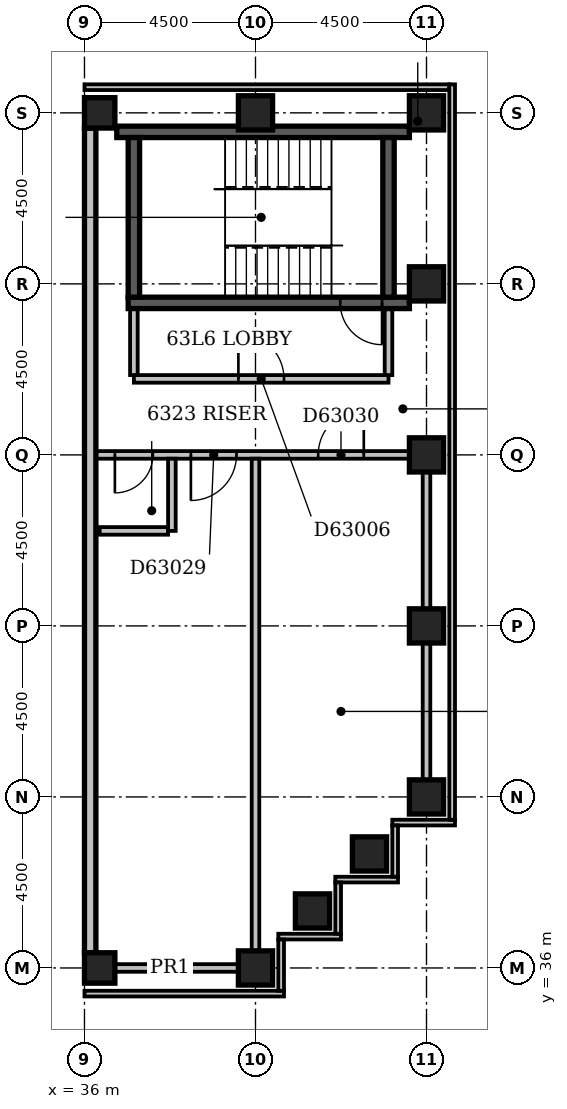
"""IFC4 building model, lengths in metres.
Left out: names, types, materials, properties, quantities, classifications, styles, units other than length and angle.
Written with IfcOpenShell. Run it as: python <this file> out.ifc"""

import sys

from ifc_helpers import new_model, si_unit, direction, frame, frame_2d, origin, origin_2d, place, context, subcontext, project, spatial, rectangle, extrude, element, fill, save


model = new_model("IFC4")
c1 = context("Model", 3, precision=1e-05, world=origin(), true_north=direction((0.0, 1.0)))
c2 = subcontext(c1, "Body", "Model", "MODEL_VIEW")
j1 = project(units=[si_unit("LENGTHUNIT", "METRE"), si_unit("PLANEANGLEUNIT", "RADIAN")], contexts=[c1])
p1 = place(None, origin())
s1 = spatial("IfcSite", under=j1, at=p1, CompositionType="ELEMENT")
p2 = place(p1, origin())
s2 = spatial("IfcBuilding", under=s1, at=p2, CompositionType="ELEMENT")
p3 = place(p2, frame((0.0, 0.0, 243.8)))
s3 = spatial("IfcBuildingStorey", under=s2, at=p3, CompositionType="ELEMENT", Elevation=243.8)
p4 = place(p3, frame((36.85, 58.0, -0.3), z_axis=(0.0, 0.0, 1.0), x_axis=(1.0, 0.0, 0.0)))
e1 = element("IfcWall", 1, at=p4, inside=s3, PredefinedType="SHEAR", context=c2, shape_type="SweptSolid", body=[
    extrude(rectangle(XDim=7.7, YDim=0.3, at=frame_2d((3.85, 0.0))), origin(), (0.0, 0.0, 1.0), 3.6),
])
p5 = place(p3, frame((37.15, 53.5, -0.3), z_axis=(0.0, 0.0, 1.0), x_axis=(1.0, 0.0, 0.0)))
e2 = element("IfcWall", 2, at=p5, inside=s3, PredefinedType="SHEAR", context=c2, shape_type="SweptSolid", body=[
    extrude(rectangle(XDim=7.4, YDim=0.3, at=frame_2d((3.7, 0.0))), origin(), (0.0, 0.0, 1.0), 3.6),
])
p6 = place(p5, frame((5.58, 0.0, 0.3)))
e3 = element("IfcOpeningElement", 3, at=p6, cuts=e2, PredefinedType="OPENING", context=c2, shape_type="SweptSolid", body=[
    extrude(rectangle(XDim=1.1, YDim=2.1, at=frame_2d((0.55, 1.05))), frame((0.0, 0.162, 0.0), z_axis=(0.0, -1.0, 0.0), x_axis=(1.0, 0.0, 0.0)), (0.0, 0.0, 1.0), 0.324),
])
for number, where, z_axis, x_axis in (
    (4, (37.3, 53.65, -0.3), (0.0, 0.0, 1.0), (0.0, 1.0, 0.0)),
    (5, (44.0, 53.65, -0.3), (0.0, 0.0, 1.0), (0.0, 1.0, 0.0)),
):
    element("IfcWall", number, at=place(p3, frame(where, z_axis=z_axis, x_axis=x_axis)), inside=s3, PredefinedType="SHEAR", context=c2, shape_type="SweptSolid", body=[
        extrude(rectangle(XDim=4.2, YDim=0.3, at=frame_2d((2.1, 0.0))), origin(), (0.0, 0.0, 1.0), 3.6),
    ])
p7 = place(p3, frame((36.4, 36.0, -0.3), z_axis=(0.0, 0.0, 1.0), x_axis=(1.0, 0.0, 0.0)))
e6 = element("IfcColumn", 6, at=p7, inside=s3, PredefinedType="COLUMN", context=c2, shape_type="SweptSolid", body=[
    extrude(rectangle(XDim=0.8, YDim=0.8, at=origin_2d()), origin(), (0.0, 0.0, 1.0), 3.6),
])
for number, where, z_axis, x_axis in (
    (7, (40.5, 36.0, -0.3), (0.0, 0.0, 1.0), (1.0, 0.0, 0.0)),
    (8, (42.0, 37.5, -0.3), (0.0, 0.0, 1.0), (1.0, 0.0, 0.0)),
    (9, (43.5, 39.0, -0.3), (0.0, 0.0, 1.0), (1.0, 0.0, 0.0)),
    (10, (45.0, 40.5, -0.3), (0.0, 0.0, 1.0), (1.0, 0.0, 0.0)),
    (11, (45.0, 45.0, -0.3), (0.0, 0.0, 1.0), (1.0, 0.0, 0.0)),
    (12, (45.0, 49.5, -0.3), (0.0, 0.0, 1.0), (1.0, 0.0, 0.0)),
    (13, (45.0, 54.0, -0.3), (0.0, 0.0, 1.0), (1.0, 0.0, 0.0)),
):
    element("IfcColumn", number, at=place(p3, frame(where, z_axis=z_axis, x_axis=x_axis)), inside=s3, PredefinedType="COLUMN", context=c2, shape_type="SweptSolid", body=[
        extrude(rectangle(XDim=0.9, YDim=0.9, at=origin_2d()), origin(), (0.0, 0.0, 1.0), 3.6),
    ])
p8 = place(p3, frame((36.4, 58.5, -0.3), z_axis=(0.0, 0.0, 1.0), x_axis=(1.0, 0.0, 0.0)))
e14 = element("IfcColumn", 14, at=p8, inside=s3, PredefinedType="COLUMN", context=c2, shape_type="SweptSolid", body=[
    extrude(rectangle(XDim=0.8, YDim=0.8, at=origin_2d()), origin(), (0.0, 0.0, 1.0), 3.6),
])
for number, where, z_axis, x_axis in (
    (15, (40.5, 58.5, -0.3), (0.0, 0.0, 1.0), (1.0, 0.0, 0.0)),
    (16, (45.0, 58.5, -0.3), (0.0, 0.0, 1.0), (1.0, 0.0, 0.0)),
):
    element("IfcColumn", number, at=place(p3, frame(where, z_axis=z_axis, x_axis=x_axis)), inside=s3, PredefinedType="COLUMN", context=c2, shape_type="SweptSolid", body=[
        extrude(rectangle(XDim=0.9, YDim=0.9, at=origin_2d()), origin(), (0.0, 0.0, 1.0), 3.6),
    ])
p9 = place(p3, frame((36.0, 35.325, 0.0), z_axis=(0.0, 0.0, 1.0), x_axis=(1.0, 0.0, 0.0)))
e17 = element("IfcWall", 17, at=p9, inside=s3, PredefinedType="STANDARD", context=c2, shape_type="SweptSolid", body=[
    extrude(rectangle(XDim=5.25, YDim=0.15, at=frame_2d((2.625, 0.0))), origin(), (0.0, 0.0, 1.0), 2.7),
])
p10 = place(p3, frame((41.175, 35.4, 0.0), z_axis=(0.0, 0.0, 1.0), x_axis=(0.0, 1.0, 0.0)))
e18 = element("IfcWall", 18, at=p10, inside=s3, PredefinedType="STANDARD", context=c2, shape_type="SweptSolid", body=[
    extrude(rectangle(XDim=1.35, YDim=0.15, at=frame_2d((0.675, 0.0))), origin(), (0.0, 0.0, 1.0), 2.7),
])
p11 = place(p3, frame((41.1, 36.825, 0.0), z_axis=(0.0, 0.0, 1.0), x_axis=(1.0, 0.0, 0.0)))
e19 = element("IfcWall", 19, at=p11, inside=s3, PredefinedType="STANDARD", context=c2, shape_type="SweptSolid", body=[
    extrude(rectangle(XDim=1.65, YDim=0.15, at=frame_2d((0.825, 0.0))), origin(), (0.0, 0.0, 1.0), 2.7),
])
p12 = place(p3, frame((42.675, 36.9, 0.0), z_axis=(0.0, 0.0, 1.0), x_axis=(0.0, 1.0, 0.0)))
e20 = element("IfcWall", 20, at=p12, inside=s3, PredefinedType="STANDARD", context=c2, shape_type="SweptSolid", body=[
    extrude(rectangle(XDim=1.35, YDim=0.15, at=frame_2d((0.675, 0.0))), origin(), (0.0, 0.0, 1.0), 2.7),
])
p13 = place(p3, frame((42.6, 38.325, 0.0), z_axis=(0.0, 0.0, 1.0), x_axis=(1.0, 0.0, 0.0)))
e21 = element("IfcWall", 21, at=p13, inside=s3, PredefinedType="STANDARD", context=c2, shape_type="SweptSolid", body=[
    extrude(rectangle(XDim=1.65, YDim=0.15, at=frame_2d((0.825, 0.0))), origin(), (0.0, 0.0, 1.0), 2.7),
])
p14 = place(p3, frame((44.175, 38.4, 0.0), z_axis=(0.0, 0.0, 1.0), x_axis=(0.0, 1.0, 0.0)))
e22 = element("IfcWall", 22, at=p14, inside=s3, PredefinedType="STANDARD", context=c2, shape_type="SweptSolid", body=[
    extrude(rectangle(XDim=1.35, YDim=0.15, at=frame_2d((0.675, 0.0))), origin(), (0.0, 0.0, 1.0), 2.7),
])
p15 = place(p3, frame((44.1, 39.825, 0.0), z_axis=(0.0, 0.0, 1.0), x_axis=(1.0, 0.0, 0.0)))
e23 = element("IfcWall", 23, at=p15, inside=s3, PredefinedType="STANDARD", context=c2, shape_type="SweptSolid", body=[
    extrude(rectangle(XDim=1.65, YDim=0.15, at=frame_2d((0.825, 0.0))), origin(), (0.0, 0.0, 1.0), 2.7),
])
p16 = place(p3, frame((45.675, 39.9, 0.0), z_axis=(0.0, 0.0, 1.0), x_axis=(0.0, 1.0, 0.0)))
e24 = element("IfcWall", 24, at=p16, inside=s3, PredefinedType="STANDARD", context=c2, shape_type="SweptSolid", body=[
    extrude(rectangle(XDim=19.35, YDim=0.15, at=frame_2d((9.675, 0.0))), origin(), (0.0, 0.0, 1.0), 2.7),
])
p17 = place(p3, frame((45.6, 59.175, 0.0), z_axis=(0.0, 0.0, 1.0), x_axis=(-1.0, 0.0, 0.0)))
e25 = element("IfcWall", 25, at=p17, inside=s3, PredefinedType="STANDARD", context=c2, shape_type="SweptSolid", body=[
    extrude(rectangle(XDim=9.6, YDim=0.15, at=frame_2d((4.8, 0.0))), origin(), (0.0, 0.0, 1.0), 2.7),
])
p18 = place(p3, frame((36.15, 36.4, 0.0), z_axis=(0.0, 0.0, 1.0), x_axis=(0.0, 1.0, 0.0)))
e26 = element("IfcWall", 26, at=p18, inside=s3, PredefinedType="STANDARD", context=c2, shape_type="SweptSolid", body=[
    extrude(rectangle(XDim=21.7, YDim=0.3, at=frame_2d((10.85, 0.0))), origin(), (0.0, 0.0, 1.0), 3.3),
])
p19 = place(p3, frame((37.3, 51.5, 0.0), z_axis=(0.0, 0.0, 1.0), x_axis=(1.0, 0.0, 0.0)))
e27 = element("IfcWall", 27, at=p19, inside=s3, PredefinedType="PARTITIONING", context=c2, shape_type="SweptSolid", body=[
    extrude(rectangle(XDim=6.7, YDim=0.2, at=frame_2d((3.35, 0.0))), origin(), (0.0, 0.0, 1.0), 3.3),
])
p20 = place(p19, frame((2.75, 0.0, 0.0)))
e28 = element("IfcOpeningElement", 28, at=p20, cuts=e27, PredefinedType="OPENING", context=c2, shape_type="SweptSolid", body=[
    extrude(rectangle(XDim=1.2, YDim=2.1, at=frame_2d((0.6, 1.05))), frame((0.0, 0.112, 0.0), z_axis=(0.0, -1.0, 0.0), x_axis=(1.0, 0.0, 0.0)), (0.0, 0.0, 1.0), 0.224),
])
for number, where, z_axis, x_axis in (
    (29, (44.0, 51.6, 0.0), (0.0, 0.0, 1.0), (0.0, 1.0, 0.0)),
    (30, (37.3, 51.6, 0.0), (0.0, 0.0, 1.0), (0.0, 1.0, 0.0)),
):
    element("IfcWall", number, at=place(p3, frame(where, z_axis=z_axis, x_axis=x_axis)), inside=s3, PredefinedType="PARTITIONING", context=c2, shape_type="SweptSolid", body=[
        extrude(rectangle(XDim=1.73, YDim=0.2, at=frame_2d((0.865, 0.0))), origin(), (0.0, 0.0, 1.0), 3.3),
    ])
p21 = place(p3, frame((36.45, 36.0, 0.0), z_axis=(0.0, 0.0, 1.0), x_axis=(1.0, 0.0, 0.0)))
e31 = element("IfcWall", 31, at=p21, inside=s3, PredefinedType="PARTITIONING", context=c2, shape_type="SweptSolid", body=[
    extrude(rectangle(XDim=3.6, YDim=0.2, at=frame_2d((1.8, 0.0))), origin(), (0.0, 0.0, 1.0), 2.7),
])
p22 = place(p3, frame((40.5, 36.45, 0.0), z_axis=(0.0, 0.0, 1.0), x_axis=(0.0, 1.0, 0.0)))
e32 = element("IfcWall", 32, at=p22, inside=s3, PredefinedType="PARTITIONING", context=c2, shape_type="SweptSolid", body=[
    extrude(rectangle(XDim=12.95, YDim=0.2, at=frame_2d((6.475, 0.0))), origin(), (0.0, 0.0, 1.0), 3.3),
])
p23 = place(p3, frame((45.0, 40.95, 0.0), z_axis=(0.0, 0.0, 1.0), x_axis=(0.0, 1.0, 0.0)))
e33 = element("IfcWall", 33, at=p23, inside=s3, PredefinedType="PARTITIONING", context=c2, shape_type="SweptSolid", body=[
    extrude(rectangle(XDim=8.1, YDim=0.2, at=frame_2d((4.05, 0.0))), origin(), (0.0, 0.0, 1.0), 2.7),
])
p24 = place(p3, frame((36.4, 47.5, 0.0), z_axis=(0.0, 0.0, 1.0), x_axis=(1.0, 0.0, 0.0)))
e34 = element("IfcWall", 34, at=p24, inside=s3, PredefinedType="PARTITIONING", context=c2, shape_type="SweptSolid", body=[
    extrude(rectangle(XDim=1.8, YDim=0.2, at=frame_2d((0.9, 0.0))), origin(), (0.0, 0.0, 1.0), 3.3),
])
p25 = place(p3, frame((38.3, 47.5, 0.0), z_axis=(0.0, 0.0, 1.0), x_axis=(0.0, 1.0, 0.0)))
e35 = element("IfcWall", 35, at=p25, inside=s3, PredefinedType="PARTITIONING", context=c2, shape_type="SweptSolid", body=[
    extrude(rectangle(XDim=1.9, YDim=0.2, at=frame_2d((0.95, 0.0))), origin(), (0.0, 0.0, 1.0), 3.3),
])
p26 = place(p3, frame((36.0, 49.5, 0.0), z_axis=(0.0, 0.0, 1.0), x_axis=(1.0, 0.0, 0.0)))
e36 = element("IfcWall", 36, at=p26, inside=s3, PredefinedType="PARTITIONING", context=c2, shape_type="SweptSolid", body=[
    extrude(rectangle(XDim=8.55, YDim=0.2, at=frame_2d((4.275, 0.0))), origin(), (0.0, 0.0, 1.0), 3.3),
])
p27 = place(p26, frame((2.8, 0.0, 0.0)))
e37 = element("IfcOpeningElement", 37, at=p27, cuts=e36, PredefinedType="OPENING", context=c2, shape_type="SweptSolid", body=[
    extrude(rectangle(XDim=1.2, YDim=2.1, at=frame_2d((0.6, 1.05))), frame((0.0, 0.112, 0.0), z_axis=(0.0, -1.0, 0.0), x_axis=(1.0, 0.0, 0.0)), (0.0, 0.0, 1.0), 0.224),
])
p28 = place(p26, frame((6.15, 0.0, 0.0)))
e38 = element("IfcOpeningElement", 38, at=p28, cuts=e36, PredefinedType="OPENING", context=c2, shape_type="SweptSolid", body=[
    extrude(rectangle(XDim=1.2, YDim=2.1, at=frame_2d((0.6, 1.05))), frame((0.0, 0.112, 0.0), z_axis=(0.0, -1.0, 0.0), x_axis=(1.0, 0.0, 0.0)), (0.0, 0.0, 1.0), 0.224),
])
p29 = place(p26, frame((0.8, 0.0, 0.0)))
e39 = element("IfcOpeningElement", 39, at=p29, cuts=e36, PredefinedType="OPENING", context=c2, shape_type="SweptSolid", body=[
    extrude(rectangle(XDim=1.0, YDim=2.1, at=frame_2d((0.5, 1.05))), frame((0.0, 0.112, 0.0), z_axis=(0.0, -1.0, 0.0), x_axis=(1.0, 0.0, 0.0)), (0.0, 0.0, 1.0), 0.224),
])
p30 = place(p20, origin())
e40 = element("IfcDoor", 40, at=p30, inside=s3, OperationType="SINGLE_SWING_LEFT", PredefinedType="DOOR", context=c2, shape_type="SweptSolid", body=[
    extrude(rectangle(XDim=1.2, YDim=2.1, at=frame_2d((0.6, 1.05))), frame((0.0, 0.025, 0.0), z_axis=(0.0, -1.0, 0.0), x_axis=(1.0, 0.0, 0.0)), (0.0, 0.0, 1.0), 0.05),
])
fill(e28, e40)
p31 = place(p6, origin())
e41 = element("IfcDoor", 41, at=p31, inside=s3, OperationType="SINGLE_SWING_RIGHT", PredefinedType="DOOR", context=c2, shape_type="SweptSolid", body=[
    extrude(rectangle(XDim=1.1, YDim=2.1, at=frame_2d((0.55, 1.05))), frame((0.0, 0.025, 0.0), z_axis=(0.0, -1.0, 0.0), x_axis=(1.0, 0.0, 0.0)), (0.0, 0.0, 1.0), 0.05),
])
fill(e3, e41)
p32 = place(p27, frame((1.2, 0.0, 0.0), z_axis=(0.0, 0.0, 1.0), x_axis=(-1.0, 0.0, 0.0)))
e42 = element("IfcDoor", 42, at=p32, inside=s3, OperationType="SINGLE_SWING_RIGHT", PredefinedType="DOOR", context=c2, shape_type="SweptSolid", body=[
    extrude(rectangle(XDim=1.2, YDim=2.1, at=frame_2d((0.6, 1.05))), frame((0.0, 0.025, 0.0), z_axis=(0.0, -1.0, 0.0), x_axis=(1.0, 0.0, 0.0)), (0.0, 0.0, 1.0), 0.05),
])
fill(e37, e42)
p33 = place(p28, frame((1.2, 0.0, 0.0), z_axis=(0.0, 0.0, 1.0), x_axis=(-1.0, 0.0, 0.0)))
e43 = element("IfcDoor", 43, at=p33, inside=s3, OperationType="SINGLE_SWING_LEFT", PredefinedType="DOOR", context=c2, shape_type="SweptSolid", body=[
    extrude(rectangle(XDim=1.2, YDim=2.1, at=frame_2d((0.6, 1.05))), frame((0.0, 0.025, 0.0), z_axis=(0.0, -1.0, 0.0), x_axis=(1.0, 0.0, 0.0)), (0.0, 0.0, 1.0), 0.05),
])
fill(e38, e43)
p34 = place(p29, frame((1.0, 0.0, 0.0), z_axis=(0.0, 0.0, 1.0), x_axis=(-1.0, 0.0, 0.0)))
e44 = element("IfcDoor", 44, at=p34, inside=s3, OperationType="SINGLE_SWING_RIGHT", PredefinedType="DOOR", context=c2, shape_type="SweptSolid", body=[
    extrude(rectangle(XDim=1.0, YDim=2.1, at=frame_2d((0.5, 1.05))), frame((0.0, 0.025, 0.0), z_axis=(0.0, -1.0, 0.0), x_axis=(1.0, 0.0, 0.0)), (0.0, 0.0, 1.0), 0.05),
])
fill(e39, e44)
save(model, sys.argv[1])
